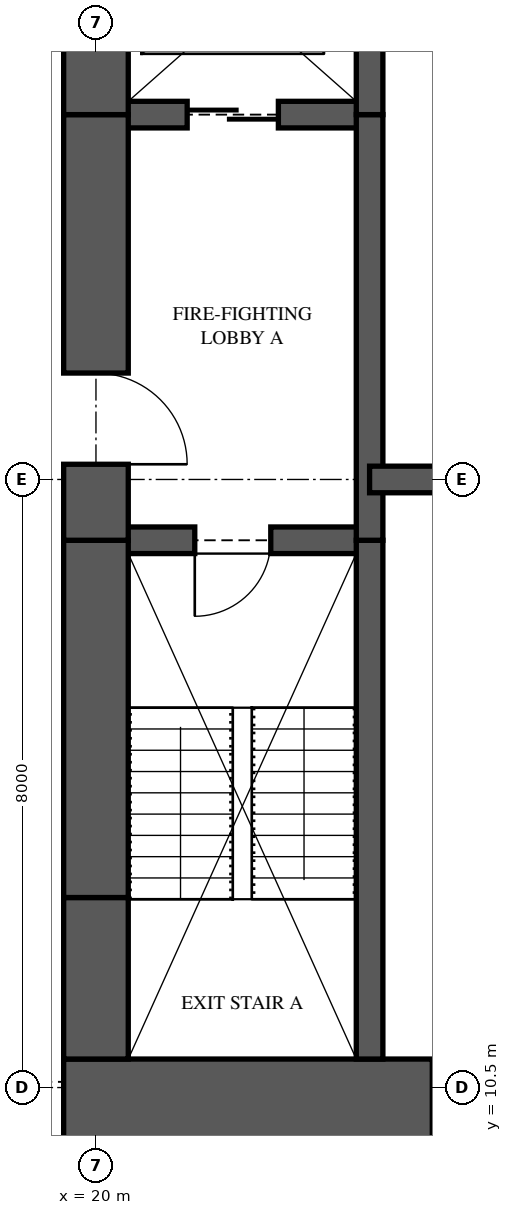
"""IFC4 building model, lengths in metres.
Left out: names, types, materials, properties, quantities, classifications, styles, units other than length and angle.
Written with IfcOpenShell. Run it as: python <this file> out.ifc"""

import sys

from ifc_helpers import new_model, si_unit, direction, frame, frame_2d, origin, place, context, subcontext, project, spatial, rectangle, extrude, element, fill, save


model = new_model("IFC4")
c1 = context("Model", 3, precision=1e-05, world=origin(), true_north=direction((0.0, 1.0)))
c2 = subcontext(c1, "Body", "Model", "MODEL_VIEW")
j1 = project(units=[si_unit("LENGTHUNIT", "METRE"), si_unit("PLANEANGLEUNIT", "RADIAN")], contexts=[c1])
p1 = place(None, origin())
s1 = spatial("IfcSite", under=j1, at=p1, CompositionType="ELEMENT")
p2 = place(p1, origin())
s2 = spatial("IfcBuilding", under=s1, at=p2, CompositionType="ELEMENT")
p3 = place(p2, frame((0.0, 0.0, 88.1)))
s3 = spatial("IfcBuildingStorey", under=s2, at=p3, CompositionType="ELEMENT", Elevation=88.1)
p4 = place(p3, frame((19.575, 10.125, 0.0), z_axis=(0.0, 0.0, 1.0), x_axis=(1.0, 0.0, 0.0)))
e1 = element("IfcWall", 1, at=p4, inside=s3, PredefinedType="SHEAR", context=c2, shape_type="SweptSolid", body=[
    extrude(rectangle(XDim=6.425, YDim=1.5, at=frame_2d((3.212, 0.0))), origin(), (0.0, 0.0, 1.0), 3.35),
])
p5 = place(p4, frame((4.85, 0.0, 0.0)))
e2 = element("IfcOpeningElement", 2, at=p5, cuts=e1, PredefinedType="OPENING", context=c2, shape_type="SweptSolid", body=[
    extrude(rectangle(XDim=0.75, YDim=2.1, at=frame_2d((0.375, 1.05))), frame((0.0, 0.76, 0.0), z_axis=(0.0, -1.0, 0.0), x_axis=(1.0, 0.0, 0.0)), (0.0, 0.0, 1.0), 1.52),
])
p6 = place(p3, frame((20.0, 26.125, 0.0), z_axis=(0.0, 0.0, 1.0), x_axis=(0.0, -1.0, 0.0)))
e3 = element("IfcWall", 3, at=p6, inside=s3, PredefinedType="SHEAR", context=c2, shape_type="SweptSolid", body=[
    extrude(rectangle(XDim=2.825, YDim=0.85, at=frame_2d((1.413, 0.0))), origin(), (0.0, 0.0, 1.0), 3.35),
])
p7 = place(p3, frame((20.0, 23.3, 0.0), z_axis=(0.0, 0.0, 1.0), x_axis=(0.0, -1.0, 0.0)))
e4 = element("IfcWall", 4, at=p7, inside=s3, PredefinedType="SHEAR", context=c2, shape_type="SweptSolid", body=[
    extrude(rectangle(XDim=5.6, YDim=0.85, at=frame_2d((2.8, 0.0))), origin(), (0.0, 0.0, 1.0), 3.35),
])
p8 = place(p7, frame((3.4, 0.0, 0.0)))
e5 = element("IfcOpeningElement", 5, at=p8, cuts=e4, PredefinedType="OPENING", context=c2, shape_type="SweptSolid", body=[
    extrude(rectangle(XDim=1.2, YDim=2.2, at=frame_2d((0.6, 1.1))), frame((0.0, 0.435, 0.0), z_axis=(0.0, -1.0, 0.0), x_axis=(1.0, 0.0, 0.0)), (0.0, 0.0, 1.0), 0.87),
])
p9 = place(p3, frame((20.0, 17.7, 0.0), z_axis=(0.0, 0.0, 1.0), x_axis=(0.0, -1.0, 0.0)))
e6 = element("IfcWall", 6, at=p9, inside=s3, PredefinedType="SHEAR", context=c2, shape_type="SweptSolid", body=[
    extrude(rectangle(XDim=4.7, YDim=0.85, at=frame_2d((2.35, 0.0))), origin(), (0.0, 0.0, 1.0), 3.35),
])
p10 = place(p3, frame((20.0, 13.0, 0.0), z_axis=(0.0, 0.0, 1.0), x_axis=(0.0, -1.0, 0.0)))
e7 = element("IfcWall", 7, at=p10, inside=s3, PredefinedType="SHEAR", context=c2, shape_type="SweptSolid", body=[
    extrude(rectangle(XDim=2.125, YDim=0.85, at=frame_2d((1.062, 0.0))), origin(), (0.0, 0.0, 1.0), 3.35),
])
p11 = place(p3, frame((23.6, 10.875, 0.0), z_axis=(0.0, 0.0, 1.0), x_axis=(0.0, 1.0, 0.0)))
e8 = element("IfcWall", 8, at=p11, inside=s3, PredefinedType="SHEAR", context=c2, shape_type="SweptSolid", body=[
    extrude(rectangle(XDim=6.825, YDim=0.35, at=frame_2d((3.413, 0.0))), origin(), (0.0, 0.0, 1.0), 3.35),
])
p12 = place(p3, frame((23.6, 17.7, 0.0), z_axis=(0.0, 0.0, 1.0), x_axis=(0.0, 1.0, 0.0)))
e9 = element("IfcWall", 9, at=p12, inside=s3, PredefinedType="SHEAR", context=c2, shape_type="SweptSolid", body=[
    extrude(rectangle(XDim=5.6, YDim=0.35, at=frame_2d((2.8, 0.0))), origin(), (0.0, 0.0, 1.0), 3.35),
])
p13 = place(p3, frame((23.6, 23.3, 0.0), z_axis=(0.0, 0.0, 1.0), x_axis=(0.0, 1.0, 0.0)))
e10 = element("IfcWall", 10, at=p13, inside=s3, PredefinedType="SHEAR", context=c2, shape_type="SweptSolid", body=[
    extrude(rectangle(XDim=2.825, YDim=0.35, at=frame_2d((1.413, 0.0))), origin(), (0.0, 0.0, 1.0), 3.35),
])
p14 = place(p3, frame((20.0, 17.7, 0.0), z_axis=(0.0, 0.0, 1.0), x_axis=(1.0, 0.0, 0.0)))
e11 = element("IfcWall", 11, at=p14, inside=s3, PredefinedType="SHEAR", context=c2, shape_type="SweptSolid", body=[
    extrude(rectangle(XDim=3.6, YDim=0.35, at=frame_2d((1.8, 0.0))), origin(), (0.0, 0.0, 1.0), 3.35),
])
p15 = place(p14, frame((1.3, 0.0, 0.0)))
e12 = element("IfcOpeningElement", 12, at=p15, cuts=e11, PredefinedType="OPENING", context=c2, shape_type="SweptSolid", body=[
    extrude(rectangle(XDim=1.0, YDim=2.1, at=frame_2d((0.5, 1.05))), frame((0.0, 0.185, 0.0), z_axis=(0.0, -1.0, 0.0), x_axis=(1.0, 0.0, 0.0)), (0.0, 0.0, 1.0), 0.37),
])
p16 = place(p3, frame((20.0, 23.3, 0.0), z_axis=(0.0, 0.0, 1.0), x_axis=(1.0, 0.0, 0.0)))
e13 = element("IfcWall", 13, at=p16, inside=s3, PredefinedType="SHEAR", context=c2, shape_type="SweptSolid", body=[
    extrude(rectangle(XDim=3.6, YDim=0.35, at=frame_2d((1.8, 0.0))), origin(), (0.0, 0.0, 1.0), 3.35),
])
p17 = place(p16, frame((1.2, 0.0, 0.0)))
e14 = element("IfcOpeningElement", 14, at=p17, cuts=e13, PredefinedType="OPENING", context=c2, shape_type="SweptSolid", body=[
    extrude(rectangle(XDim=1.2, YDim=2.1, at=frame_2d((0.6, 1.05))), frame((0.0, 0.185, 0.0), z_axis=(0.0, -1.0, 0.0), x_axis=(1.0, 0.0, 0.0)), (0.0, 0.0, 1.0), 0.37),
])
p18 = place(p3, frame((23.6, 18.5, 0.0), z_axis=(0.0, 0.0, 1.0), x_axis=(1.0, 0.0, 0.0)))
e15 = element("IfcWall", 15, at=p18, inside=s3, PredefinedType="SHEAR", context=c2, shape_type="SweptSolid", body=[
    extrude(rectangle(XDim=2.4, YDim=0.35, at=frame_2d((1.2, 0.0))), origin(), (0.0, 0.0, 1.0), 3.35),
])
p19 = place(p15, frame((1.0, 0.0, 0.0), z_axis=(0.0, 0.0, 1.0), x_axis=(-1.0, 0.0, 0.0)))
e16 = element("IfcDoor", 16, at=p19, inside=s3, OperationType="SINGLE_SWING_RIGHT", PredefinedType="DOOR", context=c2, shape_type="SweptSolid", body=[
    extrude(rectangle(XDim=1.0, YDim=2.1, at=frame_2d((0.5, 1.05))), frame((0.0, 0.025, 0.0), z_axis=(0.0, -1.0, 0.0), x_axis=(1.0, 0.0, 0.0)), (0.0, 0.0, 1.0), 0.05),
])
fill(e12, e16)
p20 = place(p8, origin())
e17 = element("IfcDoor", 17, at=p20, inside=s3, OperationType="SINGLE_SWING_RIGHT", PredefinedType="DOOR", context=c2, shape_type="SweptSolid", body=[
    extrude(rectangle(XDim=1.2, YDim=2.2, at=frame_2d((0.6, 1.1))), frame((0.0, 0.025, 0.0), z_axis=(0.0, -1.0, 0.0), x_axis=(1.0, 0.0, 0.0)), (0.0, 0.0, 1.0), 0.05),
])
fill(e5, e17)
p21 = place(p17, origin())
e18 = element("IfcDoor", 18, at=p21, inside=s3, OperationType="SLIDING_TO_LEFT", PredefinedType="DOOR", context=c2, shape_type="SweptSolid", body=[
    extrude(rectangle(XDim=1.2, YDim=2.1, at=frame_2d((0.6, 1.05))), frame((0.0, 0.025, 0.0), z_axis=(0.0, -1.0, 0.0), x_axis=(1.0, 0.0, 0.0)), (0.0, 0.0, 1.0), 0.05),
])
fill(e14, e18)
save(model, sys.argv[1])
